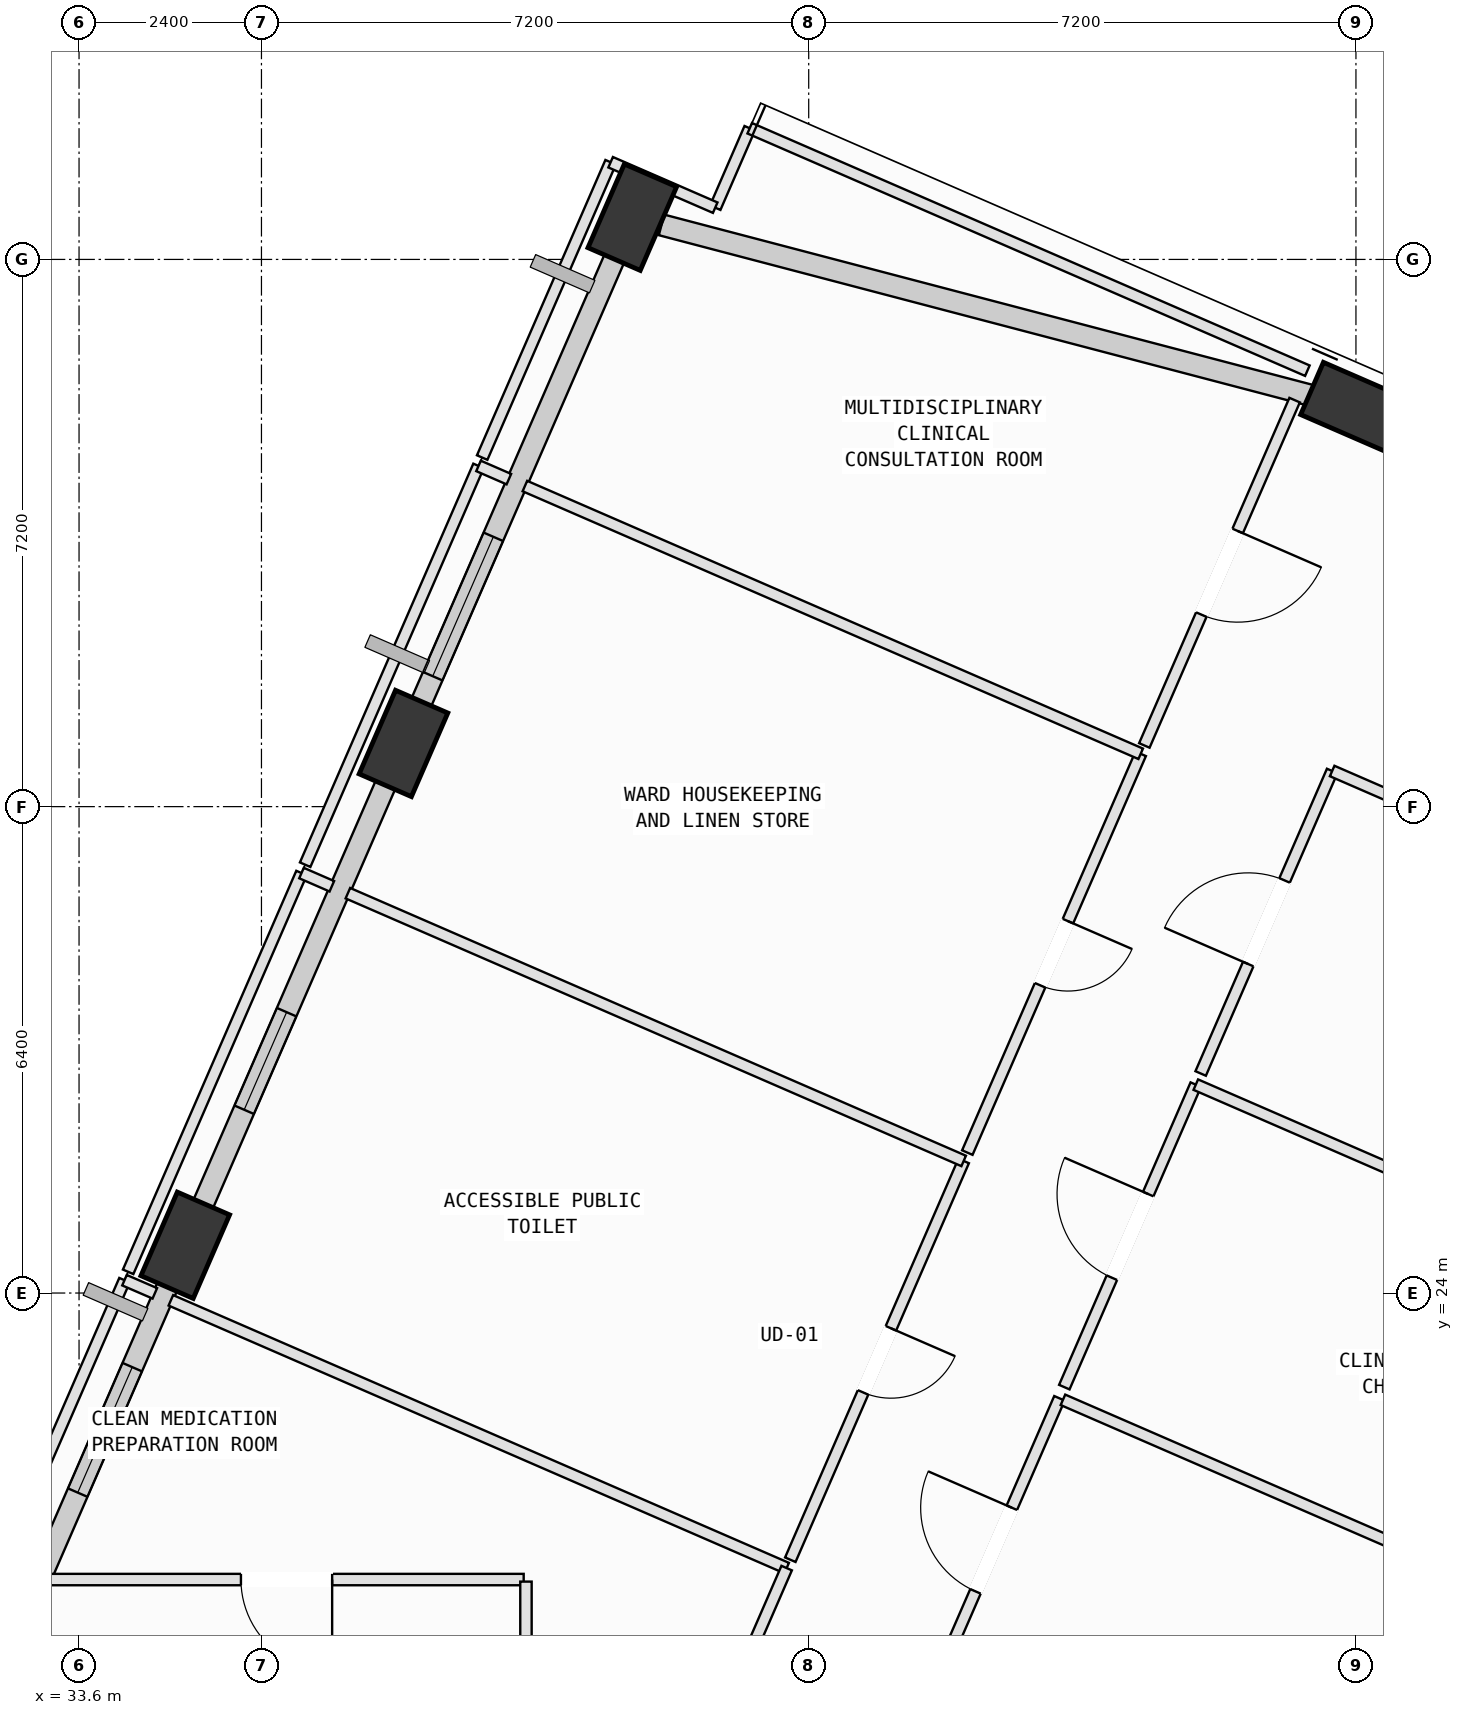
"""IFC4 building model, lengths in metres.
Left out: names, types, materials, properties, quantities, classifications, styles, units other than length and angle.
Written with IfcOpenShell. Run it as: python <this file> out.ifc"""

import sys

from ifc_helpers import new_model, si_unit, direction, frame, frame_2d, origin, origin_2d, place, context, subcontext, project, spatial, rectangle, extrude, element, fill, save


model = new_model("IFC4")
c1 = context("Model", 3, precision=1e-05, world=origin(), true_north=direction((0.0, 1.0)))
c2 = subcontext(c1, "Body", "Model", "MODEL_VIEW")
j1 = project(units=[si_unit("LENGTHUNIT", "METRE"), si_unit("PLANEANGLEUNIT", "RADIAN")], contexts=[c1])
p1 = place(None, origin())
s1 = spatial("IfcSite", under=j1, at=p1, CompositionType="ELEMENT")
p2 = place(p1, origin())
s2 = spatial("IfcBuilding", under=s1, at=p2, CompositionType="ELEMENT")
p3 = place(p2, frame((0.0, 0.0, 324.6)))
s3 = spatial("IfcBuildingStorey", under=s2, at=p3, CompositionType="ELEMENT", Elevation=324.6)
for number, where, z_axis, x_axis in (
    (1, (50.373, 35.663, 0.002), (0.0, 0.0, 1.0), (-0.917, 0.399, 0.0)),
    (2, (40.879, 38.155, 0.002), (0.0, 0.0, 1.0), (0.399, 0.917, 0.0)),
    (3, (37.868, 31.231, 0.002), (0.0, 0.0, 1.0), (0.399, 0.917, 0.0)),
    (4, (34.998, 24.628, 0.002), (0.0, 0.0, 1.0), (0.399, 0.917, 0.0)),
):
    element("IfcColumn", number, at=place(p3, frame(where, z_axis=z_axis, x_axis=x_axis)), inside=s3, PredefinedType="COLUMN", context=c2, shape_type="SweptSolid", body=[
        extrude(rectangle(XDim=1.2, YDim=0.75, at=origin_2d()), origin(), (0.0, 0.0, 1.0), 3.996),
    ])
p4 = place(p3, frame((50.737, 35.504, 0.0), z_axis=(0.0, 0.0, 1.0), x_axis=(0.917057311373, -0.398755423359, 0.0)))
e5 = element("IfcWall", 5, at=p4, inside=s3, PredefinedType="SOLIDWALL", context=c2, shape_type="SweptSolid", body=[
    extrude(rectangle(XDim=7.005, YDim=0.28, at=frame_2d((3.502, 0.0))), origin(), (0.0, 0.0, 1.0), 3.265),
])
p5 = place(p3, frame((41.264, 38.054, 0.0), z_axis=(0.0, 0.0, 1.0), x_axis=(0.967228971308, -0.253905724755, 0.0)))
e6 = element("IfcWall", 6, at=p5, inside=s3, PredefinedType="SOLIDWALL", context=c2, shape_type="SweptSolid", body=[
    extrude(rectangle(XDim=9.02, YDim=0.28, at=frame_2d((4.51, 0.0))), origin(), (0.0, 0.0, 1.0), 3.265),
])
p6 = place(p3, frame((38.027, 31.596, 0.0), z_axis=(0.0, 0.0, 1.0), x_axis=(0.398764437463, 0.917053391802, 0.0)))
e7 = element("IfcWall", 7, at=p6, inside=s3, PredefinedType="SOLIDWALL", context=c2, shape_type="SweptSolid", body=[
    extrude(rectangle(XDim=6.755, YDim=0.28, at=frame_2d((3.377, 0.0))), origin(), (0.0, 0.0, 1.0), 3.265),
])
p7 = place(p6, frame((0.567, 0.0, 0.75)))
e8 = element("IfcOpeningElement", 8, at=p7, cuts=e7, PredefinedType="OPENING", context=c2, shape_type="SweptSolid", body=[
    extrude(rectangle(XDim=2.0, YDim=1.95, at=frame_2d((1.0, 0.975))), frame((0.0, 0.15, 0.0), z_axis=(0.0, -1.0, 0.0), x_axis=(1.0, 0.0, 0.0)), (0.0, 0.0, 1.0), 0.3),
])
p8 = place(p3, frame((35.156, 24.993, 0.0), z_axis=(0.0, 0.0, 1.0), x_axis=(0.398758169539, 0.917056117272, 0.0)))
e9 = element("IfcWall", 9, at=p8, inside=s3, PredefinedType="SOLIDWALL", context=c2, shape_type="SweptSolid", body=[
    extrude(rectangle(XDim=6.405, YDim=0.28, at=frame_2d((3.202, 0.0))), origin(), (0.0, 0.0, 1.0), 3.265),
])
p9 = place(p8, frame((1.547, 0.0, 0.75)))
e10 = element("IfcOpeningElement", 10, at=p9, cuts=e9, PredefinedType="OPENING", context=c2, shape_type="SweptSolid", body=[
    extrude(rectangle(XDim=1.4, YDim=1.85, at=frame_2d((0.7, 0.925))), frame((0.0, 0.15, 0.0), z_axis=(0.0, -1.0, 0.0), x_axis=(1.0, 0.0, 0.0)), (0.0, 0.0, 1.0), 0.3),
])
p10 = place(p3, frame((32.385, 18.619, 0.0), z_axis=(0.0, 0.0, 1.0), x_axis=(0.398753668733, 0.917058074318, 0.0)))
e11 = element("IfcWall", 11, at=p10, inside=s3, PredefinedType="SOLIDWALL", context=c2, shape_type="SweptSolid", body=[
    extrude(rectangle(XDim=6.155, YDim=0.28, at=frame_2d((3.078, 0.0))), origin(), (0.0, 0.0, 1.0), 3.265),
])
p11 = place(p10, frame((3.004, 0.0, 0.75)))
e12 = element("IfcOpeningElement", 12, at=p11, cuts=e11, PredefinedType="OPENING", context=c2, shape_type="SweptSolid", body=[
    extrude(rectangle(XDim=1.8, YDim=2.05, at=frame_2d((0.9, 1.025))), frame((0.0, 0.15, 0.0), z_axis=(0.0, -1.0, 0.0), x_axis=(1.0, 0.0, 0.0)), (0.0, 0.0, 1.0), 0.3),
])
p12 = place(p3, frame((44.768, 18.635, 0.0), z_axis=(0.0, 0.0, 1.0), x_axis=(0.398828954963, 0.91702533481, 0.0)))
e13 = element("IfcWall", 13, at=p12, inside=s3, PredefinedType="PARTITIONING", context=c2, shape_type="SweptSolid", body=[
    extrude(rectangle(XDim=4.34, YDim=0.15, at=frame_2d((2.17, 0.0))), origin(), (0.0, 0.0, 1.0), 3.415),
])
p13 = place(p12, frame((1.57, 0.0, 0.0)))
e14 = element("IfcOpeningElement", 14, at=p13, cuts=e13, PredefinedType="OPENING", context=c2, shape_type="SweptSolid", body=[
    extrude(rectangle(XDim=1.2, YDim=2.15, at=frame_2d((0.6, 1.075))), frame((0.0, 0.085, 0.0), z_axis=(0.0, -1.0, 0.0), x_axis=(1.0, 0.0, 0.0)), (0.0, 0.0, 1.0), 0.17),
])
p14 = place(p3, frame((46.545, 22.595, 0.0), z_axis=(0.0, 0.0, 1.0), x_axis=(0.917099421132, -0.39865856539, 0.0)))
e15 = element("IfcWall", 15, at=p14, inside=s3, PredefinedType="PARTITIONING", context=c2, shape_type="SweptSolid", body=[
    extrude(rectangle(XDim=9.384, YDim=0.15, at=frame_2d((4.692, 0.0))), origin(), (0.0, 0.0, 1.0), 3.78),
])
p15 = place(p3, frame((46.563, 22.762, 0.0), z_axis=(0.0, 0.0, 1.0), x_axis=(0.398639711207, 0.917107616722, 0.0)))
e16 = element("IfcWall", 16, at=p15, inside=s3, PredefinedType="PARTITIONING", context=c2, shape_type="SweptSolid", body=[
    extrude(rectangle(XDim=4.34, YDim=0.15, at=frame_2d((2.17, 0.0))), origin(), (0.0, 0.0, 1.0), 3.415),
])
p16 = place(p15, frame((1.57, 0.0, 0.0)))
e17 = element("IfcOpeningElement", 17, at=p16, cuts=e16, PredefinedType="OPENING", context=c2, shape_type="SweptSolid", body=[
    extrude(rectangle(XDim=1.2, YDim=2.15, at=frame_2d((0.6, 1.075))), frame((0.0, 0.085, 0.0), z_axis=(0.0, -1.0, 0.0), x_axis=(1.0, 0.0, 0.0)), (0.0, 0.0, 1.0), 0.17),
])
p17 = place(p3, frame((48.293, 26.742, 0.0), z_axis=(0.0, 0.0, 1.0), x_axis=(0.917063062267, -0.398742197197, 0.0)))
e18 = element("IfcWall", 18, at=p17, inside=s3, PredefinedType="PARTITIONING", context=c2, shape_type="SweptSolid", body=[
    extrude(rectangle(XDim=9.435, YDim=0.15, at=frame_2d((4.717, 0.0))), origin(), (0.0, 0.0, 1.0), 3.78),
])
p18 = place(p3, frame((48.357, 26.889, 0.0), z_axis=(0.0, 0.0, 1.0), x_axis=(0.398639711207, 0.917107616722, 0.0)))
e19 = element("IfcWall", 19, at=p18, inside=s3, PredefinedType="PARTITIONING", context=c2, shape_type="SweptSolid", body=[
    extrude(rectangle(XDim=4.34, YDim=0.15, at=frame_2d((2.17, 0.0))), origin(), (0.0, 0.0, 1.0), 3.78),
])
p19 = place(p18, frame((1.57, 0.0, 0.0)))
e20 = element("IfcOpeningElement", 20, at=p19, cuts=e19, PredefinedType="OPENING", context=c2, shape_type="SweptSolid", body=[
    extrude(rectangle(XDim=1.2, YDim=2.15, at=frame_2d((0.6, 1.075))), frame((0.0, 0.085, 0.0), z_axis=(0.0, -1.0, 0.0), x_axis=(1.0, 0.0, 0.0)), (0.0, 0.0, 1.0), 0.17),
])
p20 = place(p3, frame((50.087, 30.869, 0.0), z_axis=(0.0, 0.0, 1.0), x_axis=(0.917068340421, -0.398730057805, 0.0)))
e21 = element("IfcWall", 21, at=p20, inside=s3, PredefinedType="PARTITIONING", context=c2, shape_type="SweptSolid", body=[
    extrude(rectangle(XDim=9.049, YDim=0.15, at=frame_2d((4.524, 0.0))), origin(), (0.0, 0.0, 1.0), 3.78),
])
p21 = place(p3, frame((39.45, 20.23, 0.0), z_axis=(0.0, 0.0, 1.0), x_axis=(-1.0, 0.0, 0.0)))
e22 = element("IfcWall", 22, at=p21, inside=s3, PredefinedType="PARTITIONING", context=c2, shape_type="SweptSolid", body=[
    extrude(rectangle(XDim=6.24, YDim=0.15, at=frame_2d((3.12, 0.0))), origin(), (0.0, 0.0, 1.0), 3.78),
])
p22 = place(p21, frame((2.52, 0.0, 0.0)))
e23 = element("IfcOpeningElement", 23, at=p22, cuts=e22, PredefinedType="OPENING", context=c2, shape_type="SweptSolid", body=[
    extrude(rectangle(XDim=1.2, YDim=2.15, at=frame_2d((0.6, 1.075))), frame((0.0, 0.085, 0.0), z_axis=(0.0, -1.0, 0.0), x_axis=(1.0, 0.0, 0.0)), (0.0, 0.0, 1.0), 0.17),
])
p23 = place(p3, frame((32.485, 20.23, 0.0), z_axis=(0.0, 0.0, 1.0), x_axis=(0.398784305347, 0.917044752348, 0.0)))
e24 = element("IfcWall", 24, at=p23, inside=s3, PredefinedType="PARTITIONING", context=c2, shape_type="SweptSolid", body=[
    extrude(rectangle(XDim=4.295, YDim=0.15, at=frame_2d((2.147, 0.0))), origin(), (0.0, 0.0, 1.0), 3.78),
])
p24 = place(p3, frame((34.198, 24.169, 0.0), z_axis=(0.0, 0.0, 1.0), x_axis=(0.917569282622, -0.397575919276, 0.0)))
e25 = element("IfcWall", 25, at=p24, inside=s3, PredefinedType="PARTITIONING", context=c2, shape_type="SweptSolid", body=[
    extrude(rectangle(XDim=0.435, YDim=0.15, at=frame_2d((0.217, 0.0))), origin(), (0.0, 0.0, 1.0), 3.78),
])
p25 = place(p3, frame((34.808, 23.904, 0.0), z_axis=(0.0, 0.0, 1.0), x_axis=(0.917052481723, -0.398766530398, 0.0)))
e26 = element("IfcWall", 26, at=p25, inside=s3, PredefinedType="PARTITIONING", context=c2, shape_type="SweptSolid", body=[
    extrude(rectangle(XDim=8.835, YDim=0.15, at=frame_2d((4.417, 0.0))), origin(), (0.0, 0.0, 1.0), 3.78),
])
p26 = place(p3, frame((42.91, 20.381, 0.0), z_axis=(0.0, 0.0, 1.0), x_axis=(-0.398677741034, -0.917091085337, 0.0)))
e27 = element("IfcWall", 27, at=p26, inside=s3, PredefinedType="PARTITIONING", context=c2, shape_type="SweptSolid", body=[
    extrude(rectangle(XDim=5.721, YDim=0.15, at=frame_2d((2.861, 0.0))), origin(), (0.0, 0.0, 1.0), 3.78),
])
p27 = place(p3, frame((39.48, 15.634, 0.0), z_axis=(0.0, 0.0, 1.0), x_axis=(0.0, 1.0, 0.0)))
e28 = element("IfcWall", 28, at=p27, inside=s3, PredefinedType="PARTITIONING", context=c2, shape_type="SweptSolid", body=[
    extrude(rectangle(XDim=4.569, YDim=0.15, at=frame_2d((2.284, 0.0))), origin(), (0.0, 0.0, 1.0), 3.78),
])
p28 = place(p3, frame((45.239, 25.738, 0.0), z_axis=(0.0, 0.0, 1.0), x_axis=(-0.398677741034, -0.917091085337, 0.0)))
e29 = element("IfcWall", 29, at=p28, inside=s3, PredefinedType="PARTITIONING", context=c2, shape_type="SweptSolid", body=[
    extrude(rectangle(XDim=5.721, YDim=0.15, at=frame_2d((2.861, 0.0))), origin(), (0.0, 0.0, 1.0), 3.78),
])
p29 = place(p28, frame((2.401, 0.0, 0.0)))
e30 = element("IfcOpeningElement", 30, at=p29, cuts=e29, PredefinedType="OPENING", context=c2, shape_type="SweptSolid", body=[
    extrude(rectangle(XDim=0.92, YDim=2.1, at=frame_2d((0.46, 1.05))), frame((0.0, 0.085, 0.0), z_axis=(0.0, -1.0, 0.0), x_axis=(1.0, 0.0, 0.0)), (0.0, 0.0, 1.0), 0.17),
])
p30 = place(p3, frame((34.246, 24.279, 0.0), z_axis=(0.0, 0.0, 1.0), x_axis=(0.398693343221, 0.917084302598, 0.0)))
e31 = element("IfcWall", 31, at=p30, inside=s3, PredefinedType="PARTITIONING", context=c2, shape_type="SweptSolid", body=[
    extrude(rectangle(XDim=5.721, YDim=0.15, at=frame_2d((2.861, 0.0))), origin(), (0.0, 0.0, 1.0), 3.78),
])
p31 = place(p3, frame((36.527, 29.526, 0.0), z_axis=(0.0, 0.0, 1.0), x_axis=(0.916748651636, -0.399464528742, 0.0)))
e32 = element("IfcWall", 32, at=p31, inside=s3, PredefinedType="PARTITIONING", context=c2, shape_type="SweptSolid", body=[
    extrude(rectangle(XDim=0.435, YDim=0.15, at=frame_2d((0.218, 0.0))), origin(), (0.0, 0.0, 1.0), 3.78),
])
p32 = place(p3, frame((37.137, 29.261, 0.0), z_axis=(0.0, 0.0, 1.0), x_axis=(0.917056875857, -0.398756424957, 0.0)))
e33 = element("IfcWall", 33, at=p32, inside=s3, PredefinedType="PARTITIONING", context=c2, shape_type="SweptSolid", body=[
    extrude(rectangle(XDim=8.835, YDim=0.15, at=frame_2d((4.417, 0.0))), origin(), (0.0, 0.0, 1.0), 3.78),
])
p33 = place(p3, frame((47.568, 31.095, 0.0), z_axis=(0.0, 0.0, 1.0), x_axis=(-0.398677741034, -0.917091085337, 0.0)))
e34 = element("IfcWall", 34, at=p33, inside=s3, PredefinedType="PARTITIONING", context=c2, shape_type="SweptSolid", body=[
    extrude(rectangle(XDim=5.721, YDim=0.15, at=frame_2d((2.861, 0.0))), origin(), (0.0, 0.0, 1.0), 3.78),
])
p34 = place(p33, frame((2.401, 0.0, 0.0)))
e35 = element("IfcOpeningElement", 35, at=p34, cuts=e34, PredefinedType="OPENING", context=c2, shape_type="SweptSolid", body=[
    extrude(rectangle(XDim=0.92, YDim=2.1, at=frame_2d((0.46, 1.05))), frame((0.0, 0.085, 0.0), z_axis=(0.0, -1.0, 0.0), x_axis=(1.0, 0.0, 0.0)), (0.0, 0.0, 1.0), 0.17),
])
p35 = place(p3, frame((36.575, 29.636, 0.0), z_axis=(0.0, 0.0, 1.0), x_axis=(0.398677741034, 0.917091085337, 0.0)))
e36 = element("IfcWall", 36, at=p35, inside=s3, PredefinedType="PARTITIONING", context=c2, shape_type="SweptSolid", body=[
    extrude(rectangle(XDim=5.721, YDim=0.15, at=frame_2d((2.861, 0.0))), origin(), (0.0, 0.0, 1.0), 3.78),
])
p36 = place(p3, frame((38.856, 34.883, 0.0), z_axis=(0.0, 0.0, 1.0), x_axis=(0.916543116757, -0.399935888769, 0.0)))
e37 = element("IfcWall", 37, at=p36, inside=s3, PredefinedType="PARTITIONING", context=c2, shape_type="SweptSolid", body=[
    extrude(rectangle(XDim=0.435, YDim=0.15, at=frame_2d((0.218, 0.0))), origin(), (0.0, 0.0, 1.0), 3.78),
])
p37 = place(p3, frame((39.466, 34.618, 0.0), z_axis=(0.0, 0.0, 1.0), x_axis=(0.917056875857, -0.398756424957, 0.0)))
e38 = element("IfcWall", 38, at=p37, inside=s3, PredefinedType="PARTITIONING", context=c2, shape_type="SweptSolid", body=[
    extrude(rectangle(XDim=8.835, YDim=0.15, at=frame_2d((4.417, 0.0))), origin(), (0.0, 0.0, 1.0), 3.78),
])
p38 = place(p3, frame((41.97, 38.281, 0.0), z_axis=(0.0, 0.0, 1.0), x_axis=(0.398569395059, 0.917138177878, 0.0)))
e39 = element("IfcWall", 39, at=p38, inside=s3, PredefinedType="PARTITIONING", context=c2, shape_type="SweptSolid", body=[
    extrude(rectangle(XDim=1.139, YDim=0.15, at=frame_2d((0.57, 0.0))), origin(), (0.0, 0.0, 1.0), 3.78),
])
p39 = place(p3, frame((42.424, 39.326, 0.0), z_axis=(0.0, 0.0, 1.0), x_axis=(0.917071026557, -0.398723879708, 0.0)))
e40 = element("IfcWall", 40, at=p39, inside=s3, PredefinedType="PARTITIONING", context=c2, shape_type="SweptSolid", body=[
    extrude(rectangle(XDim=8.0, YDim=0.15, at=frame_2d((4.0, 0.0))), origin(), (0.0, 0.0, 1.0), 3.265),
])
p40 = place(p3, frame((49.593, 35.749, 0.0), z_axis=(0.0, 0.0, 1.0), x_axis=(-0.398967500085, -0.916965066879, 0.0)))
e41 = element("IfcWall", 41, at=p40, inside=s3, PredefinedType="PARTITIONING", context=c2, shape_type="SweptSolid", body=[
    extrude(rectangle(XDim=4.955, YDim=0.15, at=frame_2d((2.478, 0.0))), origin(), (0.0, 0.0, 1.0), 2.765),
])
p41 = place(p40, frame((1.878, 0.0, 0.0)))
e42 = element("IfcOpeningElement", 42, at=p41, cuts=e41, PredefinedType="OPENING", context=c2, shape_type="SweptSolid", body=[
    extrude(rectangle(XDim=1.2, YDim=2.15, at=frame_2d((0.6, 1.075))), frame((0.0, 0.085, 0.0), z_axis=(0.0, -1.0, 0.0), x_axis=(1.0, 0.0, 0.0)), (0.0, 0.0, 1.0), 0.17),
])
p42 = place(p3, frame((38.904, 34.993, 0.0), z_axis=(0.0, 0.0, 1.0), x_axis=(0.398801951282, 0.917037078669, 0.0)))
e43 = element("IfcWall", 43, at=p42, inside=s3, PredefinedType="PARTITIONING", context=c2, shape_type="SweptSolid", body=[
    extrude(rectangle(XDim=4.238, YDim=0.15, at=frame_2d((2.119, 0.0))), origin(), (0.0, 0.0, 1.0), 3.78),
])
p43 = place(p3, frame((40.594, 38.879, 0.0), z_axis=(0.0, 0.0, 1.0), x_axis=(0.91715541112, -0.398529737728, 0.0)))
e44 = element("IfcWall", 44, at=p43, inside=s3, PredefinedType="PARTITIONING", context=c2, shape_type="SweptSolid", body=[
    extrude(rectangle(XDim=1.5, YDim=0.15, at=frame_2d((0.75, 0.0))), origin(), (0.0, 0.0, 1.0), 3.265),
])
p44 = place(p7, origin())
e45 = element("IfcWindow", 45, at=p44, inside=s3, PartitioningType="SINGLE_PANEL", PredefinedType="WINDOW", context=c2, shape_type="SweptSolid", body=[
    extrude(rectangle(XDim=2.0, YDim=1.95, at=frame_2d((1.0, 0.975))), frame((0.0, 0.03, 0.0), z_axis=(0.0, -1.0, 0.0), x_axis=(1.0, 0.0, 0.0)), (0.0, 0.0, 1.0), 0.06),
])
fill(e8, e45)
p45 = place(p9, origin())
e46 = element("IfcWindow", 46, at=p45, inside=s3, PartitioningType="SINGLE_PANEL", PredefinedType="WINDOW", context=c2, shape_type="SweptSolid", body=[
    extrude(rectangle(XDim=1.4, YDim=1.85, at=frame_2d((0.7, 0.925))), frame((0.0, 0.03, 0.0), z_axis=(0.0, -1.0, 0.0), x_axis=(1.0, 0.0, 0.0)), (0.0, 0.0, 1.0), 0.06),
])
fill(e10, e46)
p46 = place(p11, origin())
e47 = element("IfcWindow", 47, at=p46, inside=s3, PartitioningType="SINGLE_PANEL", PredefinedType="WINDOW", context=c2, shape_type="SweptSolid", body=[
    extrude(rectangle(XDim=1.8, YDim=2.05, at=frame_2d((0.9, 1.025))), frame((0.0, 0.03, 0.0), z_axis=(0.0, -1.0, 0.0), x_axis=(1.0, 0.0, 0.0)), (0.0, 0.0, 1.0), 0.06),
])
fill(e12, e47)
p47 = place(p13, origin())
e48 = element("IfcDoor", 48, at=p47, inside=s3, OperationType="SINGLE_SWING_RIGHT", PredefinedType="DOOR", context=c2, shape_type="SweptSolid", body=[
    extrude(rectangle(XDim=1.2, YDim=2.15, at=frame_2d((0.6, 1.075))), frame((0.0, 0.025, 0.0), z_axis=(0.0, -1.0, 0.0), x_axis=(1.0, 0.0, 0.0)), (0.0, 0.0, 1.0), 0.05),
])
fill(e14, e48)
p48 = place(p16, origin())
e49 = element("IfcDoor", 49, at=p48, inside=s3, OperationType="SINGLE_SWING_RIGHT", PredefinedType="DOOR", context=c2, shape_type="SweptSolid", body=[
    extrude(rectangle(XDim=1.2, YDim=2.15, at=frame_2d((0.6, 1.075))), frame((0.0, 0.025, 0.0), z_axis=(0.0, -1.0, 0.0), x_axis=(1.0, 0.0, 0.0)), (0.0, 0.0, 1.0), 0.05),
])
fill(e17, e49)
p49 = place(p19, origin())
e50 = element("IfcDoor", 50, at=p49, inside=s3, OperationType="SINGLE_SWING_LEFT", PredefinedType="DOOR", context=c2, shape_type="SweptSolid", body=[
    extrude(rectangle(XDim=1.2, YDim=2.15, at=frame_2d((0.6, 1.075))), frame((0.0, 0.025, 0.0), z_axis=(0.0, -1.0, 0.0), x_axis=(1.0, 0.0, 0.0)), (0.0, 0.0, 1.0), 0.05),
])
fill(e20, e50)
p50 = place(p22, origin())
e51 = element("IfcDoor", 51, at=p50, inside=s3, OperationType="SINGLE_SWING_LEFT", PredefinedType="DOOR", context=c2, shape_type="SweptSolid", body=[
    extrude(rectangle(XDim=1.2, YDim=2.15, at=frame_2d((0.6, 1.075))), frame((0.0, 0.025, 0.0), z_axis=(0.0, -1.0, 0.0), x_axis=(1.0, 0.0, 0.0)), (0.0, 0.0, 1.0), 0.05),
])
fill(e23, e51)
p51 = place(p29, origin())
e52 = element("IfcDoor", 52, at=p51, inside=s3, OperationType="SINGLE_SWING_LEFT", PredefinedType="DOOR", context=c2, shape_type="SweptSolid", body=[
    extrude(rectangle(XDim=0.92, YDim=2.1, at=frame_2d((0.46, 1.05))), frame((0.0, 0.025, 0.0), z_axis=(0.0, -1.0, 0.0), x_axis=(1.0, 0.0, 0.0)), (0.0, 0.0, 1.0), 0.05),
])
fill(e30, e52)
p52 = place(p34, origin())
e53 = element("IfcDoor", 53, at=p52, inside=s3, OperationType="SINGLE_SWING_LEFT", PredefinedType="DOOR", context=c2, shape_type="SweptSolid", body=[
    extrude(rectangle(XDim=0.92, YDim=2.1, at=frame_2d((0.46, 1.05))), frame((0.0, 0.025, 0.0), z_axis=(0.0, -1.0, 0.0), x_axis=(1.0, 0.0, 0.0)), (0.0, 0.0, 1.0), 0.05),
])
fill(e35, e53)
p53 = place(p41, origin())
e54 = element("IfcDoor", 54, at=p53, inside=s3, OperationType="SINGLE_SWING_LEFT", PredefinedType="DOOR", context=c2, shape_type="SweptSolid", body=[
    extrude(rectangle(XDim=1.2, YDim=2.15, at=frame_2d((0.6, 1.075))), frame((0.0, 0.025, 0.0), z_axis=(0.0, -1.0, 0.0), x_axis=(1.0, 0.0, 0.0)), (0.0, 0.0, 1.0), 0.05),
])
fill(e42, e54)
save(model, sys.argv[1])
